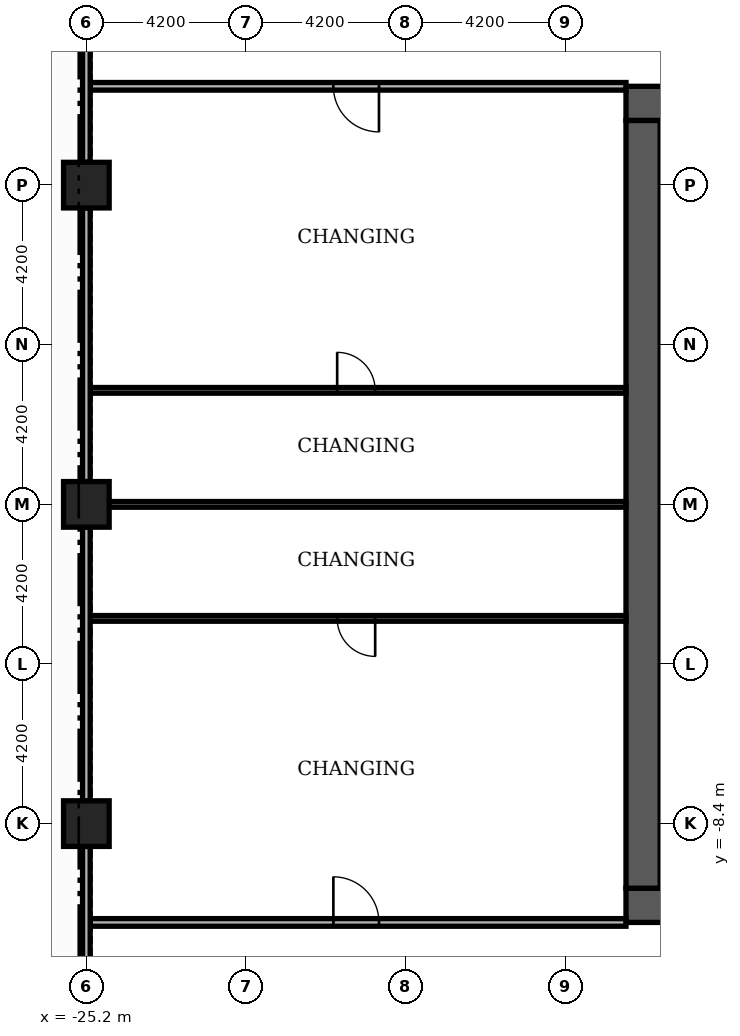
"""IFC4 building model, lengths in metres.
Left out: names, types, materials, properties, quantities, classifications, styles, units other than length and angle.
Written with IfcOpenShell. Run it as: python <this file> out.ifc"""

import sys

from ifc_helpers import new_model, si_unit, direction, frame, frame_2d, origin, origin_2d, place, context, subcontext, project, spatial, rectangle, extrude, element, fill, save


model = new_model("IFC4")
c1 = context("Model", 3, precision=1e-05, world=origin(), true_north=direction((0.0, 1.0)))
c2 = subcontext(c1, "Body", "Model", "MODEL_VIEW")
j1 = project(units=[si_unit("LENGTHUNIT", "METRE"), si_unit("PLANEANGLEUNIT", "RADIAN")], contexts=[c1])
p1 = place(None, origin())
s1 = spatial("IfcSite", under=j1, at=p1, CompositionType="ELEMENT")
p2 = place(p1, origin())
s2 = spatial("IfcBuilding", under=s1, at=p2, CompositionType="ELEMENT")
p3 = place(p2, frame((0.0, 0.0, 12.0)))
s3 = spatial("IfcBuildingStorey", under=s2, at=p3, CompositionType="ELEMENT", Elevation=12.0)
p4 = place(p3, frame((-11.0, -10.55, 0.0), z_axis=(0.0, 0.0, 1.0), x_axis=(1.0, 0.0, 0.0)))
e1 = element("IfcWall", 1, at=p4, inside=s3, PredefinedType="SHEAR", context=c2, shape_type="SweptSolid", body=[
    extrude(rectangle(XDim=22.0, YDim=0.9, at=frame_2d((11.0, 0.0))), origin(), (0.0, 0.0, 1.0), 4.38),
])
p5 = place(p4, frame((7.4, 0.0, 0.0)))
e2 = element("IfcOpeningElement", 2, at=p5, cuts=e1, PredefinedType="OPENING", context=c2, shape_type="SweptSolid", body=[
    extrude(rectangle(XDim=1.8, YDim=2.2, at=frame_2d((0.9, 1.1))), frame((0.0, 0.46, 0.0), z_axis=(0.0, -1.0, 0.0), x_axis=(1.0, 0.0, 0.0)), (0.0, 0.0, 1.0), 0.92),
])
p6 = place(p3, frame((-11.0, 10.55, 0.0), z_axis=(0.0, 0.0, 1.0), x_axis=(1.0, 0.0, 0.0)))
e3 = element("IfcWall", 3, at=p6, inside=s3, PredefinedType="SHEAR", context=c2, shape_type="SweptSolid", body=[
    extrude(rectangle(XDim=22.0, YDim=0.9, at=frame_2d((11.0, 0.0))), origin(), (0.0, 0.0, 1.0), 4.38),
])
p7 = place(p6, frame((13.3, 0.0, 0.0)))
e4 = element("IfcOpeningElement", 4, at=p7, cuts=e3, PredefinedType="OPENING", context=c2, shape_type="SweptSolid", body=[
    extrude(rectangle(XDim=1.8, YDim=2.2, at=frame_2d((0.9, 1.1))), frame((0.0, 0.46, 0.0), z_axis=(0.0, -1.0, 0.0), x_axis=(1.0, 0.0, 0.0)), (0.0, 0.0, 1.0), 0.92),
])
p8 = place(p3, frame((-10.55, -10.1, 0.0), z_axis=(0.0, 0.0, 1.0), x_axis=(0.0, 1.0, 0.0)))
e5 = element("IfcWall", 5, at=p8, inside=s3, PredefinedType="SHEAR", context=c2, shape_type="SweptSolid", body=[
    extrude(rectangle(XDim=20.2, YDim=0.9, at=frame_2d((10.1, 0.0))), origin(), (0.0, 0.0, 1.0), 4.38),
])
for number, where, z_axis, x_axis in (
    (6, (-25.2, 0.0, 0.0), (0.0, 0.0, 1.0), (1.0, 0.0, 0.0)),
    (7, (-25.2, -8.4, 0.0), (0.0, 0.0, 1.0), (1.0, 0.0, 0.0)),
    (8, (-25.2, 8.4, 0.0), (0.0, 0.0, 1.0), (1.0, 0.0, 0.0)),
):
    element("IfcColumn", number, at=place(p3, frame(where, z_axis=z_axis, x_axis=x_axis)), inside=s3, PredefinedType="COLUMN", context=c2, shape_type="SweptSolid", body=[
        extrude(rectangle(XDim=1.2, YDim=1.2, at=origin_2d()), origin(), (0.0, 0.0, 1.0), 4.8),
    ])
p9 = place(p3, frame((-25.1, -11.0, 0.0), z_axis=(0.0, 0.0, 1.0), x_axis=(1.0, 0.0, 0.0)))
e9 = element("IfcWall", 9, at=p9, inside=s3, PredefinedType="PARTITIONING", context=c2, shape_type="SweptSolid", body=[
    extrude(rectangle(XDim=14.1, YDim=0.2, at=frame_2d((7.05, 0.0))), origin(), (0.0, 0.0, 1.0), 4.38),
])
p10 = place(p9, frame((6.4, 0.0, 0.0)))
e10 = element("IfcOpeningElement", 10, at=p10, cuts=e9, PredefinedType="OPENING", context=c2, shape_type="SweptSolid", body=[
    extrude(rectangle(XDim=1.2, YDim=2.2, at=frame_2d((0.6, 1.1))), frame((0.0, 0.11, 0.0), z_axis=(0.0, -1.0, 0.0), x_axis=(1.0, 0.0, 0.0)), (0.0, 0.0, 1.0), 0.22),
])
p11 = place(p3, frame((-25.1, -3.0, 0.0), z_axis=(0.0, 0.0, 1.0), x_axis=(1.0, 0.0, 0.0)))
e11 = element("IfcWall", 11, at=p11, inside=s3, PredefinedType="PARTITIONING", context=c2, shape_type="SweptSolid", body=[
    extrude(rectangle(XDim=14.1, YDim=0.15, at=frame_2d((7.05, 0.0))), origin(), (0.0, 0.0, 1.0), 4.38),
])
p12 = place(p11, frame((6.5, 0.0, 0.0)))
e12 = element("IfcOpeningElement", 12, at=p12, cuts=e11, PredefinedType="OPENING", context=c2, shape_type="SweptSolid", body=[
    extrude(rectangle(XDim=1.0, YDim=2.1, at=frame_2d((0.5, 1.05))), frame((0.0, 0.085, 0.0), z_axis=(0.0, -1.0, 0.0), x_axis=(1.0, 0.0, 0.0)), (0.0, 0.0, 1.0), 0.17),
])
p13 = place(p3, frame((-24.6, 0.0, 0.0), z_axis=(0.0, 0.0, 1.0), x_axis=(1.0, 0.0, 0.0)))
e13 = element("IfcWall", 13, at=p13, inside=s3, PredefinedType="PARTITIONING", context=c2, shape_type="SweptSolid", body=[
    extrude(rectangle(XDim=13.6, YDim=0.15, at=frame_2d((6.8, 0.0))), origin(), (0.0, 0.0, 1.0), 4.38),
])
p14 = place(p3, frame((-25.1, 3.0, 0.0), z_axis=(0.0, 0.0, 1.0), x_axis=(1.0, 0.0, 0.0)))
e14 = element("IfcWall", 14, at=p14, inside=s3, PredefinedType="PARTITIONING", context=c2, shape_type="SweptSolid", body=[
    extrude(rectangle(XDim=14.1, YDim=0.15, at=frame_2d((7.05, 0.0))), origin(), (0.0, 0.0, 1.0), 4.38),
])
p15 = place(p14, frame((6.5, 0.0, 0.0)))
e15 = element("IfcOpeningElement", 15, at=p15, cuts=e14, PredefinedType="OPENING", context=c2, shape_type="SweptSolid", body=[
    extrude(rectangle(XDim=1.0, YDim=2.1, at=frame_2d((0.5, 1.05))), frame((0.0, 0.085, 0.0), z_axis=(0.0, -1.0, 0.0), x_axis=(1.0, 0.0, 0.0)), (0.0, 0.0, 1.0), 0.17),
])
p16 = place(p3, frame((-25.1, 11.0, 0.0), z_axis=(0.0, 0.0, 1.0), x_axis=(1.0, 0.0, 0.0)))
e16 = element("IfcWall", 16, at=p16, inside=s3, PredefinedType="PARTITIONING", context=c2, shape_type="SweptSolid", body=[
    extrude(rectangle(XDim=14.1, YDim=0.2, at=frame_2d((7.05, 0.0))), origin(), (0.0, 0.0, 1.0), 4.38),
])
p17 = place(p16, frame((6.4, 0.0, 0.0)))
e17 = element("IfcOpeningElement", 17, at=p17, cuts=e16, PredefinedType="OPENING", context=c2, shape_type="SweptSolid", body=[
    extrude(rectangle(XDim=1.2, YDim=2.2, at=frame_2d((0.6, 1.1))), frame((0.0, 0.11, 0.0), z_axis=(0.0, -1.0, 0.0), x_axis=(1.0, 0.0, 0.0)), (0.0, 0.0, 1.0), 0.22),
])
p18 = place(p3, frame((-25.2, -16.2, 0.0), z_axis=(0.0, 0.0, 1.0), x_axis=(0.0, 1.0, 0.0)))
e18 = element("IfcWall", 18, at=p18, inside=s3, PredefinedType="PARTITIONING", context=c2, shape_type="SweptSolid", body=[
    extrude(rectangle(XDim=7.2, YDim=0.2, at=frame_2d((3.6, 0.0))), origin(), (0.0, 0.0, 1.0), 4.08),
])
p19 = place(p18, frame((1.5, 0.0, 0.0)))
e19 = element("IfcOpeningElement", 19, at=p19, cuts=e18, PredefinedType="OPENING", context=c2, shape_type="SweptSolid", body=[
    extrude(rectangle(XDim=1.8, YDim=2.2, at=frame_2d((0.9, 1.1))), frame((0.0, 0.11, 0.0), z_axis=(0.0, -1.0, 0.0), x_axis=(1.0, 0.0, 0.0)), (0.0, 0.0, 1.0), 0.22),
])
for number, where, z_axis, x_axis in (
    (20, (-25.2, -7.8, 0.0), (0.0, 0.0, 1.0), (0.0, 1.0, 0.0)),
    (21, (-25.2, 0.6, 0.0), (0.0, 0.0, 1.0), (0.0, 1.0, 0.0)),
):
    element("IfcWall", number, at=place(p3, frame(where, z_axis=z_axis, x_axis=x_axis)), inside=s3, PredefinedType="PARTITIONING", context=c2, shape_type="SweptSolid", body=[
        extrude(rectangle(XDim=7.2, YDim=0.2, at=frame_2d((3.6, 0.0))), origin(), (0.0, 0.0, 1.0), 4.08),
    ])
p20 = place(p3, frame((-25.2, 9.0, 0.0), z_axis=(0.0, 0.0, 1.0), x_axis=(0.0, 1.0, 0.0)))
e22 = element("IfcWall", 22, at=p20, inside=s3, PredefinedType="PARTITIONING", context=c2, shape_type="SweptSolid", body=[
    extrude(rectangle(XDim=7.2, YDim=0.2, at=frame_2d((3.6, 0.0))), origin(), (0.0, 0.0, 1.0), 4.08),
])
p21 = place(p20, frame((3.9, 0.0, 0.0)))
e23 = element("IfcOpeningElement", 23, at=p21, cuts=e22, PredefinedType="OPENING", context=c2, shape_type="SweptSolid", body=[
    extrude(rectangle(XDim=1.8, YDim=2.2, at=frame_2d((0.9, 1.1))), frame((0.0, 0.11, 0.0), z_axis=(0.0, -1.0, 0.0), x_axis=(1.0, 0.0, 0.0)), (0.0, 0.0, 1.0), 0.22),
])
p22 = place(p10, origin())
e24 = element("IfcDoor", 24, at=p22, inside=s3, OperationType="SINGLE_SWING_LEFT", PredefinedType="DOOR", context=c2, shape_type="SweptSolid", body=[
    extrude(rectangle(XDim=1.2, YDim=2.2, at=frame_2d((0.6, 1.1))), frame((0.0, 0.025, 0.0), z_axis=(0.0, -1.0, 0.0), x_axis=(1.0, 0.0, 0.0)), (0.0, 0.0, 1.0), 0.05),
])
fill(e10, e24)
p23 = place(p12, origin())
e25 = element("IfcDoor", 25, at=p23, inside=s3, OperationType="SINGLE_SWING_RIGHT", PredefinedType="DOOR", context=c2, shape_type="SweptSolid", body=[
    extrude(rectangle(XDim=1.0, YDim=2.1, at=frame_2d((0.5, 1.05))), frame((0.0, 0.025, 0.0), z_axis=(0.0, -1.0, 0.0), x_axis=(1.0, 0.0, 0.0)), (0.0, 0.0, 1.0), 0.05),
])
fill(e12, e25)
p24 = place(p15, origin())
e26 = element("IfcDoor", 26, at=p24, inside=s3, OperationType="SINGLE_SWING_LEFT", PredefinedType="DOOR", context=c2, shape_type="SweptSolid", body=[
    extrude(rectangle(XDim=1.0, YDim=2.1, at=frame_2d((0.5, 1.05))), frame((0.0, 0.025, 0.0), z_axis=(0.0, -1.0, 0.0), x_axis=(1.0, 0.0, 0.0)), (0.0, 0.0, 1.0), 0.05),
])
fill(e15, e26)
p25 = place(p17, origin())
e27 = element("IfcDoor", 27, at=p25, inside=s3, OperationType="SINGLE_SWING_RIGHT", PredefinedType="DOOR", context=c2, shape_type="SweptSolid", body=[
    extrude(rectangle(XDim=1.2, YDim=2.2, at=frame_2d((0.6, 1.1))), frame((0.0, 0.025, 0.0), z_axis=(0.0, -1.0, 0.0), x_axis=(1.0, 0.0, 0.0)), (0.0, 0.0, 1.0), 0.05),
])
fill(e17, e27)
save(model, sys.argv[1])
